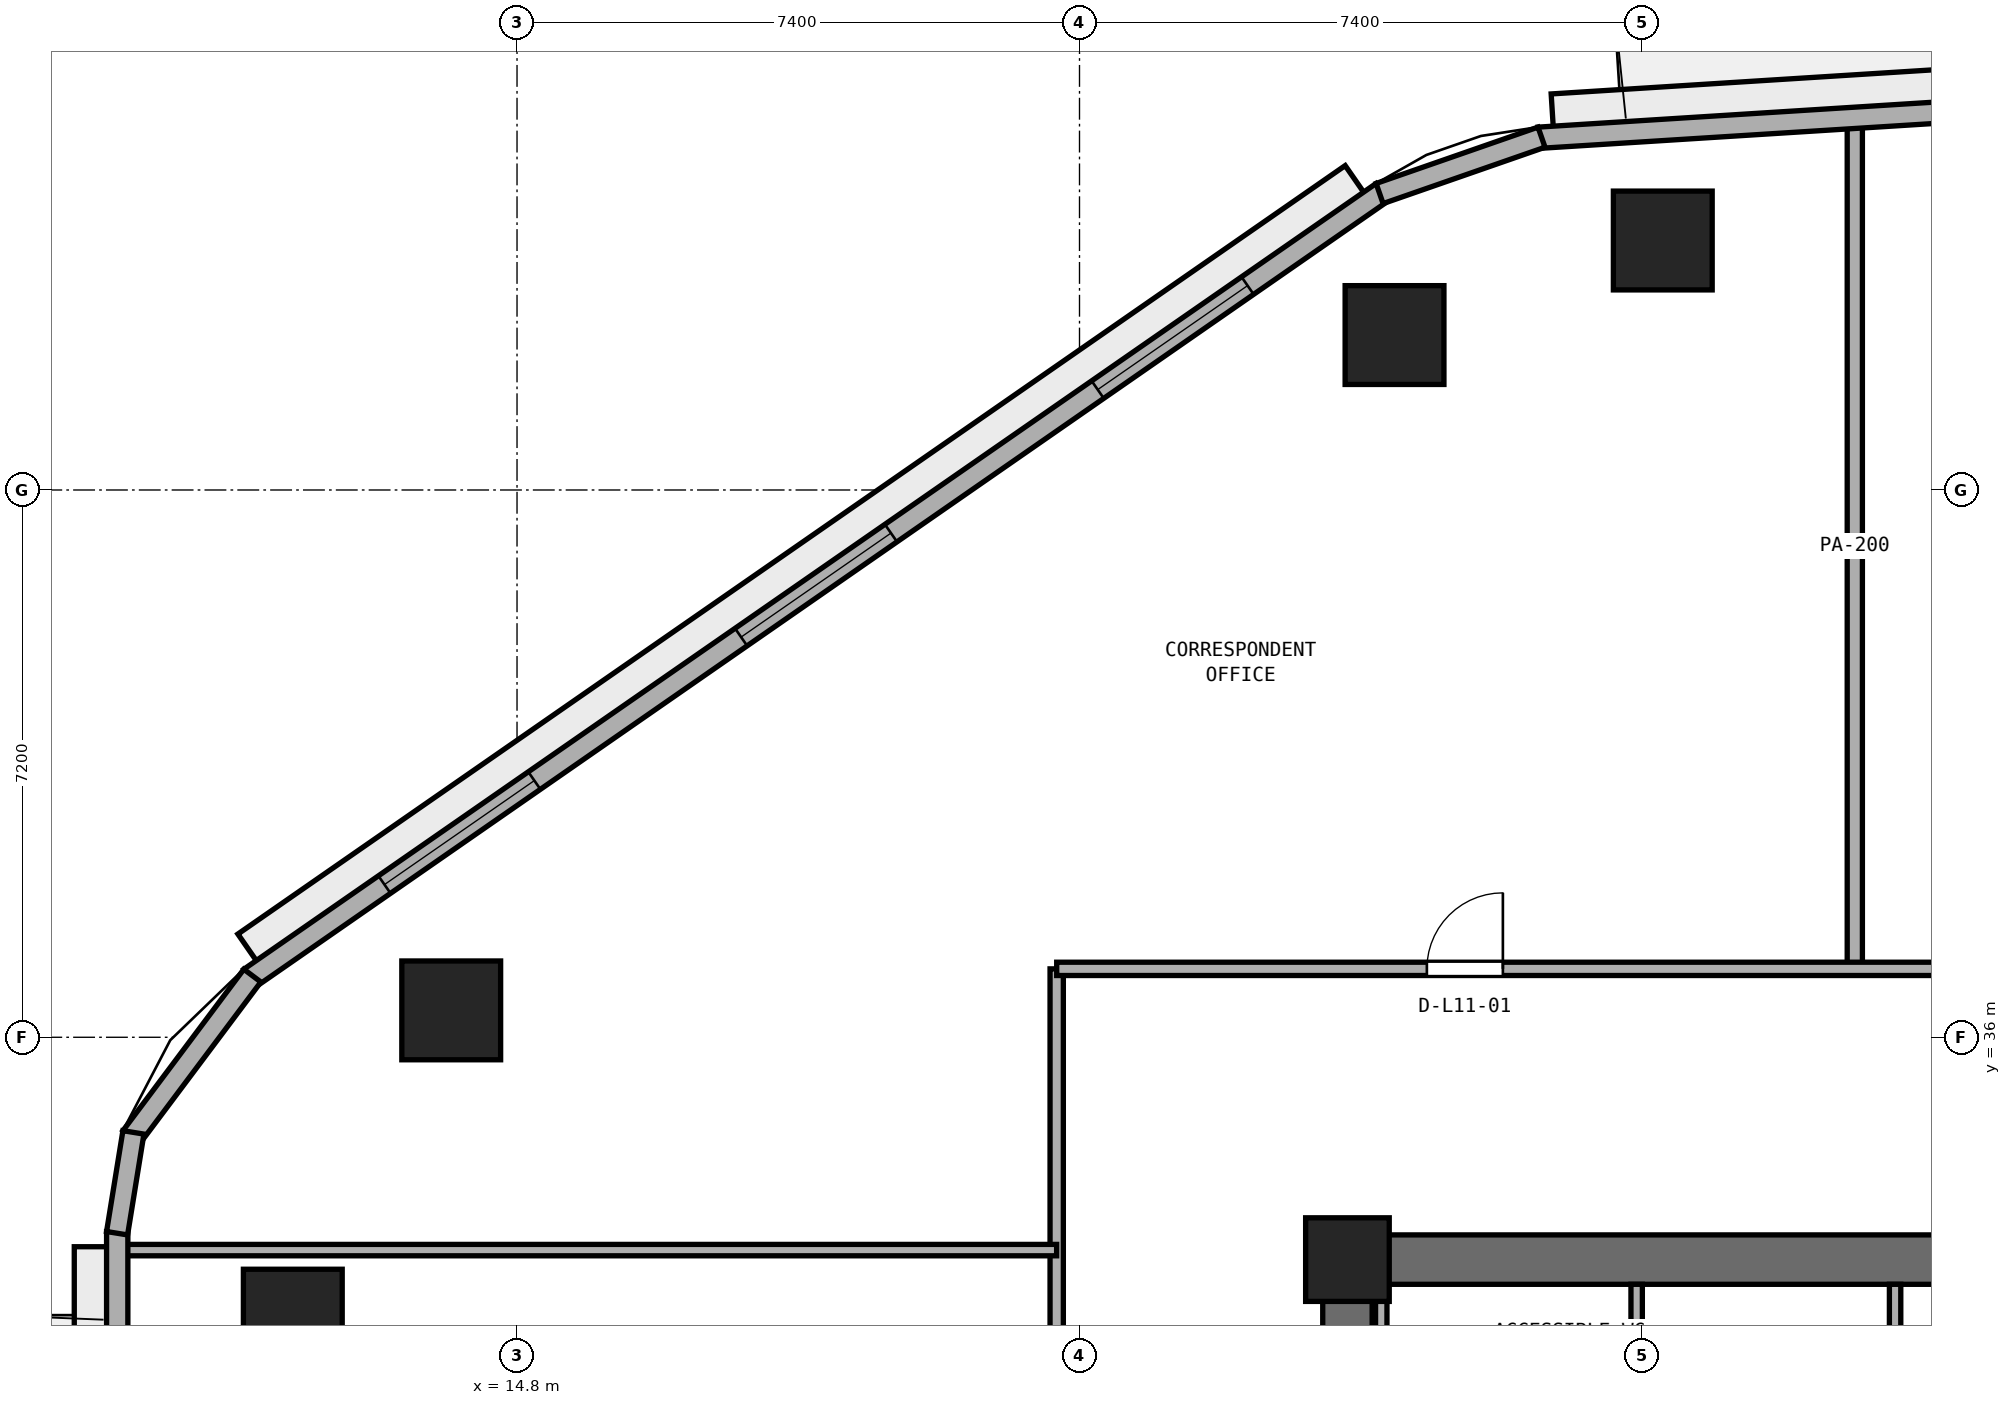
"""IFC4 building model, lengths in metres.
Left out: names, types, materials, properties, quantities, classifications, styles, units other than length and angle.
Written with IfcOpenShell. Run it as: python <this file> out.ifc"""

import sys

from ifc_helpers import new_model, si_unit, direction, frame, frame_2d, origin, origin_2d, place, context, subcontext, project, spatial, rectangle, extrude, element, fill, save


model = new_model("IFC4")
c1 = context("Model", 3, precision=1e-05, world=origin(), true_north=direction((0.0, 1.0)))
c2 = subcontext(c1, "Body", "Model", "MODEL_VIEW")
j1 = project(units=[si_unit("LENGTHUNIT", "METRE"), si_unit("PLANEANGLEUNIT", "RADIAN")], contexts=[c1])
p1 = place(None, origin())
s1 = spatial("IfcSite", under=j1, at=p1, CompositionType="ELEMENT")
p2 = place(p1, origin())
s2 = spatial("IfcBuilding", under=s1, at=p2, CompositionType="ELEMENT")
p3 = place(p2, frame((0.0, 0.0, 47.8)))
s3 = spatial("IfcBuildingStorey", under=s2, at=p3, CompositionType="ELEMENT", Elevation=47.8)
p4 = place(p3, frame((25.4, 33.075, 0.0), z_axis=(0.0, 0.0, 1.0), x_axis=(1.0, 0.0, 0.0)))
e1 = element("IfcWall", 1, at=p4, inside=s3, PredefinedType="SHEAR", context=c2, shape_type="SweptSolid", body=[
    extrude(rectangle(XDim=23.2, YDim=0.65, at=frame_2d((11.6, 0.0))), origin(), (0.0, 0.0, 1.0), 3.525),
])
p5 = place(p3, frame((25.725, 17.65, 0.0), z_axis=(0.0, 0.0, 1.0), x_axis=(0.0, 1.0, 0.0)))
e2 = element("IfcWall", 2, at=p5, inside=s3, PredefinedType="SHEAR", context=c2, shape_type="SweptSolid", body=[
    extrude(rectangle(XDim=15.1, YDim=0.65, at=frame_2d((7.55, 0.0))), origin(), (0.0, 0.0, 1.0), 3.525),
])
p6 = place(p5, frame((6.8, 0.0, 0.0)))
e3 = element("IfcOpeningElement", 3, at=p6, cuts=e2, PredefinedType="OPENING", context=c2, shape_type="SweptSolid", body=[
    extrude(rectangle(XDim=1.5, YDim=2.15, at=frame_2d((0.75, 1.075))), frame((0.0, 0.335, 0.0), z_axis=(0.0, -1.0, 0.0), x_axis=(1.0, 0.0, 0.0)), (0.0, 0.0, 1.0), 0.67),
])
p7 = place(p3, frame((25.725, 33.075, 0.0), z_axis=(0.0, 0.0, 1.0), x_axis=(1.0, 0.0, 0.0)))
e4 = element("IfcColumn", 4, at=p7, inside=s3, PredefinedType="PILASTER", context=c2, shape_type="SweptSolid", body=[
    extrude(rectangle(XDim=1.1, YDim=1.1, at=origin_2d()), origin(), (0.0, 0.0, 1.0), 3.8),
])
for number, where, z_axis, x_axis in (
    (5, (29.874, 46.482, 0.0), (0.0, 0.0, 1.0), (1.0, 0.0, 0.0)),
    (6, (26.344, 45.238, 0.0), (0.0, 0.0, 1.0), (1.0, 0.0, 0.0)),
    (7, (13.934, 36.354, 0.0), (0.0, 0.0, 1.0), (1.0, 0.0, 0.0)),
    (8, (11.85, 32.298, 0.0), (0.0, 0.0, 1.0), (1.0, 0.0, 0.0)),
):
    element("IfcColumn", number, at=place(p3, frame(where, z_axis=z_axis, x_axis=x_axis)), inside=s3, PredefinedType="COLUMN", context=c2, shape_type="SweptSolid", body=[
        extrude(rectangle(XDim=1.3, YDim=1.3, at=origin_2d()), origin(), (0.0, 0.0, 1.0), 3.8),
    ])
for number, where, z_axis, x_axis in (
    (9, (26.17, 30.65, 0.0), (0.0, 0.0, 1.0), (0.0, 1.0, 0.0)),
    (10, (29.53, 30.65, 0.0), (0.0, 0.0, 1.0), (0.0, 1.0, 0.0)),
    (11, (32.93, 30.65, 0.0), (0.0, 0.0, 1.0), (0.0, 1.0, 0.0)),
):
    element("IfcWall", number, at=place(p3, frame(where, z_axis=z_axis, x_axis=x_axis)), inside=s3, PredefinedType="PARTITIONING", context=c2, shape_type="SweptSolid", body=[
        extrude(rectangle(XDim=2.1, YDim=0.15, at=frame_2d((1.05, 0.0))), origin(), (0.0, 0.0, 1.0), 3.525),
    ])
p8 = place(p3, frame((32.4, 36.901, 0.0), z_axis=(0.0, 0.0, 1.0), x_axis=(0.0, 1.0, 0.0)))
e12 = element("IfcWall", 12, at=p8, inside=s3, PredefinedType="PARTITIONING", context=c2, shape_type="SweptSolid", body=[
    extrude(rectangle(XDim=11.131, YDim=0.2, at=frame_2d((5.565, 0.0))), origin(), (0.0, 0.0, 1.0), 3.525),
])
p9 = place(p3, frame((21.9, 5.958, 0.0), z_axis=(0.0, 0.0, 1.0), x_axis=(0.0, 1.0, 0.0)))
e13 = element("IfcWall", 13, at=p9, inside=s3, PredefinedType="PARTITIONING", context=c2, shape_type="SweptSolid", body=[
    extrude(rectangle(XDim=30.942, YDim=0.175, at=frame_2d((15.471, 0.0))), origin(), (0.0, 0.0, 1.0), 3.525),
])
p10 = place(p9, frame((10.292, 0.0, 0.0)))
e14 = element("IfcOpeningElement", 14, at=p10, cuts=e13, PredefinedType="OPENING", context=c2, shape_type="SweptSolid", body=[
    extrude(rectangle(XDim=1.0, YDim=2.12, at=frame_2d((0.5, 1.06))), frame((0.0, 0.097, 0.0), z_axis=(0.0, -1.0, 0.0), x_axis=(1.0, 0.0, 0.0)), (0.0, 0.0, 1.0), 0.195),
])
p11 = place(p9, frame((16.842, 0.0, 0.0)))
e15 = element("IfcOpeningElement", 15, at=p11, cuts=e13, PredefinedType="OPENING", context=c2, shape_type="SweptSolid", body=[
    extrude(rectangle(XDim=1.0, YDim=2.12, at=frame_2d((0.5, 1.06))), frame((0.0, 0.097, 0.0), z_axis=(0.0, -1.0, 0.0), x_axis=(1.0, 0.0, 0.0)), (0.0, 0.0, 1.0), 0.195),
])
p12 = place(p9, frame((23.492, 0.0, 0.0)))
e16 = element("IfcOpeningElement", 16, at=p12, cuts=e13, PredefinedType="OPENING", context=c2, shape_type="SweptSolid", body=[
    extrude(rectangle(XDim=0.9, YDim=2.1, at=frame_2d((0.45, 1.05))), frame((0.0, 0.097, 0.0), z_axis=(0.0, -1.0, 0.0), x_axis=(1.0, 0.0, 0.0)), (0.0, 0.0, 1.0), 0.195),
])
p13 = place(p3, frame((9.605, 33.2, 0.0), z_axis=(0.0, 0.0, 1.0), x_axis=(1.0, 0.0, 0.0)))
e17 = element("IfcWall", 17, at=p13, inside=s3, PredefinedType="PARTITIONING", context=c2, shape_type="SweptSolid", body=[
    extrude(rectangle(XDim=12.294, YDim=0.15, at=frame_2d((6.147, 0.0))), origin(), (0.0, 0.0, 1.0), 3.525),
])
p14 = place(p3, frame((21.9, 36.9, 0.0), z_axis=(0.0, 0.0, 1.0), x_axis=(1.0, 0.0, 0.0)))
e18 = element("IfcWall", 18, at=p14, inside=s3, PredefinedType="PARTITIONING", context=c2, shape_type="SweptSolid", body=[
    extrude(rectangle(XDim=30.2, YDim=0.175, at=frame_2d((15.1, 0.0))), origin(), (0.0, 0.0, 1.0), 3.525),
])
p15 = place(p14, frame((4.87, 0.0, 0.0)))
e19 = element("IfcOpeningElement", 19, at=p15, cuts=e18, PredefinedType="OPENING", context=c2, shape_type="SweptSolid", body=[
    extrude(rectangle(XDim=1.0, YDim=2.12, at=frame_2d((0.5, 1.06))), frame((0.0, 0.097, 0.0), z_axis=(0.0, -1.0, 0.0), x_axis=(1.0, 0.0, 0.0)), (0.0, 0.0, 1.0), 0.195),
])
p16 = place(p14, frame((15.75, 0.0, 0.0)))
e20 = element("IfcOpeningElement", 20, at=p16, cuts=e18, PredefinedType="OPENING", context=c2, shape_type="SweptSolid", body=[
    extrude(rectangle(XDim=1.0, YDim=2.12, at=frame_2d((0.5, 1.06))), frame((0.0, 0.097, 0.0), z_axis=(0.0, -1.0, 0.0), x_axis=(1.0, 0.0, 0.0)), (0.0, 0.0, 1.0), 0.195),
])
p17 = place(p14, frame((25.48, 0.0, 0.0)))
e21 = element("IfcOpeningElement", 21, at=p17, cuts=e18, PredefinedType="OPENING", context=c2, shape_type="SweptSolid", body=[
    extrude(rectangle(XDim=1.0, YDim=2.12, at=frame_2d((0.5, 1.06))), frame((0.0, 0.097, 0.0), z_axis=(0.0, -1.0, 0.0), x_axis=(1.0, 0.0, 0.0)), (0.0, 0.0, 1.0), 0.195),
])
p18 = place(p3, frame((47.832, 49.069, 0.0), z_axis=(0.0, 0.0, 1.0), x_axis=(-0.998017725054, -0.062933460723, 0.0)))
e22 = element("IfcWall", 22, at=p18, inside=s3, PredefinedType="STANDARD", context=c2, shape_type="SweptSolid", body=[
    extrude(rectangle(XDim=19.629, YDim=0.28, at=frame_2d((9.815, 0.0))), origin(), (0.0, 0.0, 1.0), 3.525),
])
p19 = place(p18, frame((9.265, 0.0, 0.0)))
e23 = element("IfcOpeningElement", 23, at=p19, cuts=e22, PredefinedType="OPENING", context=c2, shape_type="SweptSolid", body=[
    extrude(rectangle(XDim=1.1, YDim=2.2, at=frame_2d((0.55, 1.1))), frame((0.0, 0.15, 0.0), z_axis=(0.0, -1.0, 0.0), x_axis=(1.0, 0.0, 0.0)), (0.0, 0.0, 1.0), 0.3),
])
p20 = place(p3, frame((26.182, 47.118, 0.0), z_axis=(0.0, 0.0, 1.0), x_axis=(-0.821547956627, -0.570139417127, 0.0)))
e24 = element("IfcWall", 24, at=p20, inside=s3, PredefinedType="STANDARD", context=c2, shape_type="SweptSolid", body=[
    extrude(rectangle(XDim=18.132, YDim=0.28, at=frame_2d((9.066, 0.0))), origin(), (0.0, 0.0, 1.0), 3.525),
])
p21 = place(p20, frame((2.156, 0.0, 0.9)))
e25 = element("IfcOpeningElement", 25, at=p21, cuts=e24, PredefinedType="OPENING", context=c2, shape_type="SweptSolid", body=[
    extrude(rectangle(XDim=2.4, YDim=1.75, at=frame_2d((1.2, 0.875))), frame((0.0, 0.15, 0.0), z_axis=(0.0, -1.0, 0.0), x_axis=(1.0, 0.0, 0.0)), (0.0, 0.0, 1.0), 0.3),
])
p22 = place(p20, frame((7.866, 0.0, 0.9)))
e26 = element("IfcOpeningElement", 26, at=p22, cuts=e24, PredefinedType="OPENING", context=c2, shape_type="SweptSolid", body=[
    extrude(rectangle(XDim=2.4, YDim=1.75, at=frame_2d((1.2, 0.875))), frame((0.0, 0.15, 0.0), z_axis=(0.0, -1.0, 0.0), x_axis=(1.0, 0.0, 0.0)), (0.0, 0.0, 1.0), 0.3),
])
p23 = place(p20, frame((13.577, 0.0, 0.9)))
e27 = element("IfcOpeningElement", 27, at=p23, cuts=e24, PredefinedType="OPENING", context=c2, shape_type="SweptSolid", body=[
    extrude(rectangle(XDim=2.4, YDim=1.75, at=frame_2d((1.2, 0.875))), frame((0.0, 0.15, 0.0), z_axis=(0.0, -1.0, 0.0), x_axis=(1.0, 0.0, 0.0)), (0.0, 0.0, 1.0), 0.3),
])
p24 = place(p3, frame((9.54, 33.444, 0.0), z_axis=(0.0, 0.0, 1.0), x_axis=(0.0, -1.0, 0.0)))
e28 = element("IfcWall", 28, at=p24, inside=s3, PredefinedType="STANDARD", context=c2, shape_type="SweptSolid", body=[
    extrude(rectangle(XDim=17.301, YDim=0.28, at=frame_2d((8.65, 0.0))), origin(), (0.0, 0.0, 1.0), 3.525),
])
p25 = place(p24, frame((8.1, 0.0, 0.0)))
e29 = element("IfcOpeningElement", 29, at=p25, cuts=e28, PredefinedType="OPENING", context=c2, shape_type="SweptSolid", body=[
    extrude(rectangle(XDim=1.1, YDim=2.2, at=frame_2d((0.55, 1.1))), frame((0.0, 0.15, 0.0), z_axis=(0.0, -1.0, 0.0), x_axis=(1.0, 0.0, 0.0)), (0.0, 0.0, 1.0), 0.3),
])
p26 = place(p24, frame((2.017, 0.0, 0.9)))
e30 = element("IfcOpeningElement", 30, at=p26, cuts=e28, PredefinedType="OPENING", context=c2, shape_type="SweptSolid", body=[
    extrude(rectangle(XDim=2.4, YDim=1.75, at=frame_2d((1.2, 0.875))), frame((0.0, 0.15, 0.0), z_axis=(0.0, -1.0, 0.0), x_axis=(1.0, 0.0, 0.0)), (0.0, 0.0, 1.0), 0.3),
])
p27 = place(p3, frame((28.278, 47.842, 0.0), z_axis=(0.0, 0.0, 1.0), x_axis=(-0.9444559001, -0.328638179106, 0.0)))
e31 = element("IfcWall", 31, at=p27, inside=s3, PredefinedType="STANDARD", context=c2, shape_type="SweptSolid", body=[
    extrude(rectangle(XDim=2.255, YDim=0.28, at=frame_2d((1.128, 0.0))), origin(), (0.0, 0.0, 1.0), 3.525),
])
p28 = place(p3, frame((11.318, 36.811, 0.0), z_axis=(0.0, 0.0, 1.0), x_axis=(-0.599455152629, -0.800408345775, 0.0)))
e32 = element("IfcWall", 32, at=p28, inside=s3, PredefinedType="STANDARD", context=c2, shape_type="SweptSolid", body=[
    extrude(rectangle(XDim=2.653, YDim=0.28, at=frame_2d((1.327, 0.0))), origin(), (0.0, 0.0, 1.0), 3.525),
])
p29 = place(p3, frame((9.753, 34.749, 0.0), z_axis=(0.0, 0.0, 1.0), x_axis=(-0.160037671962, -0.987110907423, 0.0)))
e33 = element("IfcWall", 33, at=p29, inside=s3, PredefinedType="STANDARD", context=c2, shape_type="SweptSolid", body=[
    extrude(rectangle(XDim=1.344, YDim=0.28, at=frame_2d((0.672, 0.0))), origin(), (0.0, 0.0, 1.0), 3.525),
])
p30 = place(p15, origin())
e34 = element("IfcDoor", 34, at=p30, inside=s3, OperationType="SINGLE_SWING_RIGHT", PredefinedType="DOOR", context=c2, shape_type="SweptSolid", body=[
    extrude(rectangle(XDim=1.0, YDim=2.12, at=frame_2d((0.5, 1.06))), frame((0.0, 0.025, 0.0), z_axis=(0.0, -1.0, 0.0), x_axis=(1.0, 0.0, 0.0)), (0.0, 0.0, 1.0), 0.05),
])
fill(e19, e34)
p31 = place(p21, origin())
e35 = element("IfcWindow", 35, at=p31, inside=s3, PartitioningType="SINGLE_PANEL", PredefinedType="WINDOW", context=c2, shape_type="SweptSolid", body=[
    extrude(rectangle(XDim=2.4, YDim=1.75, at=frame_2d((1.2, 0.875))), frame((0.0, 0.03, 0.0), z_axis=(0.0, -1.0, 0.0), x_axis=(1.0, 0.0, 0.0)), (0.0, 0.0, 1.0), 0.06),
])
fill(e25, e35)
p32 = place(p22, origin())
e36 = element("IfcWindow", 36, at=p32, inside=s3, PartitioningType="SINGLE_PANEL", PredefinedType="WINDOW", context=c2, shape_type="SweptSolid", body=[
    extrude(rectangle(XDim=2.4, YDim=1.75, at=frame_2d((1.2, 0.875))), frame((0.0, 0.03, 0.0), z_axis=(0.0, -1.0, 0.0), x_axis=(1.0, 0.0, 0.0)), (0.0, 0.0, 1.0), 0.06),
])
fill(e26, e36)
p33 = place(p23, origin())
e37 = element("IfcWindow", 37, at=p33, inside=s3, PartitioningType="SINGLE_PANEL", PredefinedType="WINDOW", context=c2, shape_type="SweptSolid", body=[
    extrude(rectangle(XDim=2.4, YDim=1.75, at=frame_2d((1.2, 0.875))), frame((0.0, 0.03, 0.0), z_axis=(0.0, -1.0, 0.0), x_axis=(1.0, 0.0, 0.0)), (0.0, 0.0, 1.0), 0.06),
])
fill(e27, e37)
save(model, sys.argv[1])
